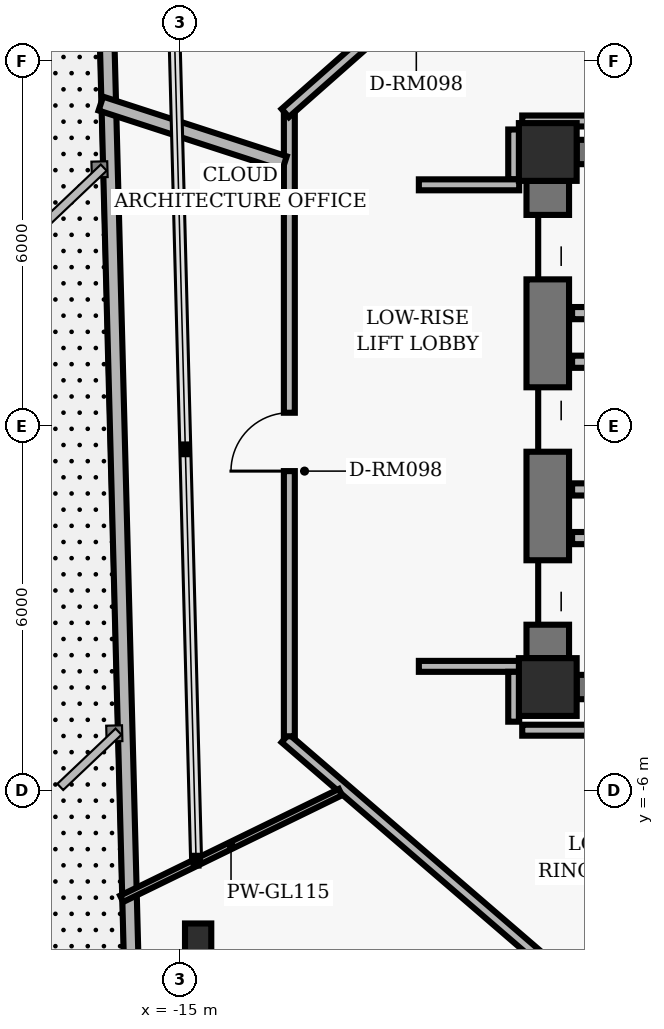
"""IFC4 building model, lengths in metres.
Left out: names, types, materials, properties, quantities, classifications, styles, units other than length and angle.
Written with IfcOpenShell. Run it as: python <this file> out.ifc"""

import sys

from ifc_helpers import new_model, si_unit, direction, frame, frame_2d, origin, origin_2d, place, context, subcontext, project, spatial, rectangle, hollow_rectangle, i_section, extrude, element, fill, save


model = new_model("IFC4")
c1 = context("Model", 3, precision=1e-05, world=origin(), true_north=direction((0.0, 1.0)))
c2 = subcontext(c1, "Body", "Model", "MODEL_VIEW")
j1 = project(units=[si_unit("LENGTHUNIT", "METRE"), si_unit("PLANEANGLEUNIT", "RADIAN")], contexts=[c1])
p1 = place(None, origin())
s1 = spatial("IfcSite", under=j1, at=p1, CompositionType="ELEMENT")
p2 = place(p1, origin())
s2 = spatial("IfcBuilding", under=s1, at=p2, CompositionType="ELEMENT")
p3 = place(p2, frame((0.0, 0.0, 18.88)))
s3 = spatial("IfcBuildingStorey", under=s2, at=p3, CompositionType="ELEMENT", Elevation=18.88)
for number, where, z_axis, x_axis in (
    (1, (-8.95, 4.5, 0.0), (0.0, 0.0, 1.0), (1.0, 0.0, 0.0)),
    (2, (-8.95, -4.3, 0.0), (0.0, 0.0, 1.0), (1.0, 0.0, 0.0)),
):
    element("IfcColumn", number, at=place(p3, frame(where, z_axis=z_axis, x_axis=x_axis)), inside=s3, PredefinedType="COLUMN", context=c2, shape_type="SweptSolid", body=[
        extrude(hollow_rectangle(XDim=0.95, YDim=0.95, WallThickness=0.06, InnerFilletRadius=0.02, OuterFilletRadius=0.04, at=origin_2d()), origin(), (0.0, 0.0, 1.0), 3.36),
    ])
p4 = place(p3, frame((-8.95, -3.825, 0.0), z_axis=(0.0, 0.0, 1.0), x_axis=(0.0, 1.0, 0.0)))
e3 = element("IfcWall", 3, at=p4, inside=s3, PredefinedType="SHEAR", context=c2, shape_type="SweptSolid", body=[
    extrude(rectangle(XDim=7.85, YDim=0.7, at=frame_2d((3.925, 0.0))), origin(), (0.0, 0.0, 1.0), 3.098),
])
p5 = place(p4, frame((0.55, 0.0, 0.0)))
e4 = element("IfcOpeningElement", 4, at=p5, cuts=e3, PredefinedType="OPENING", context=c2, shape_type="SweptSolid", body=[
    extrude(rectangle(XDim=1.06, YDim=2.04, at=frame_2d((0.53, 1.02))), frame((0.0, 0.36, 0.0), z_axis=(0.0, -1.0, 0.0), x_axis=(1.0, 0.0, 0.0)), (0.0, 0.0, 1.0), 0.72),
])
p6 = place(p4, frame((3.395, 0.0, 0.0)))
e5 = element("IfcOpeningElement", 5, at=p6, cuts=e3, PredefinedType="OPENING", context=c2, shape_type="SweptSolid", body=[
    extrude(rectangle(XDim=1.06, YDim=2.04, at=frame_2d((0.53, 1.02))), frame((0.0, 0.36, 0.0), z_axis=(0.0, -1.0, 0.0), x_axis=(1.0, 0.0, 0.0)), (0.0, 0.0, 1.0), 0.72),
])
p7 = place(p4, frame((6.23, 0.0, 0.0)))
e6 = element("IfcOpeningElement", 6, at=p7, cuts=e3, PredefinedType="OPENING", context=c2, shape_type="SweptSolid", body=[
    extrude(rectangle(XDim=1.06, YDim=2.04, at=frame_2d((0.53, 1.02))), frame((0.0, 0.36, 0.0), z_axis=(0.0, -1.0, 0.0), x_axis=(1.0, 0.0, 0.0)), (0.0, 0.0, 1.0), 0.72),
])
for number, where, z_axis, x_axis in (
    (7, (-8.475, 4.5, 0.0), (0.0, 0.0, 1.0), (1.0, 0.0, 0.0)),
    (8, (-8.475, -4.3, 0.0), (0.0, 0.0, 1.0), (1.0, 0.0, 0.0)),
):
    element("IfcWall", number, at=place(p3, frame(where, z_axis=z_axis, x_axis=x_axis)), inside=s3, PredefinedType="SHEAR", context=c2, shape_type="SweptSolid", body=[
        extrude(rectangle(XDim=1.95, YDim=0.4, at=frame_2d((0.975, 0.0))), origin(), (0.0, 0.0, 1.0), 3.098),
    ])
p8 = place(p3, frame((-14.7, -8.438, 0.0), z_axis=(0.0, 0.0, 1.0), x_axis=(1.0, 0.0, 0.0)))
e9 = element("IfcColumn", 9, at=p8, inside=s3, PredefinedType="COLUMN", context=c2, shape_type="SweptSolid", body=[
    extrude(i_section(OverallWidth=0.432, OverallDepth=0.498, WebThickness=0.056, FlangeThickness=0.089, FilletRadius=0.025, at=origin_2d()), origin(), (0.0, 0.0, 1.0), 3.36),
])
p9 = place(p3, frame((30.165, -0.311, 0.0), z_axis=(0.0, 0.0, 1.0), x_axis=(-0.852639202063, -0.522500135029, 0.0)))
e10 = element("IfcWall", 10, at=p9, inside=s3, PredefinedType="PARAPET", context=c2, shape_type="SweptSolid", body=[
    extrude(rectangle(XDim=51.035, YDim=0.24, at=frame_2d((25.518, 0.0))), origin(), (0.0, 0.0, 1.0), 1.65),
])
p10 = place(p3, frame((-15.354, -25.888, 0.0), z_axis=(0.0, 0.0, 1.0), x_axis=(-0.026174886222, 0.999657378971, 0.0)))
e11 = element("IfcWall", 11, at=p10, inside=s3, PredefinedType="PARAPET", context=c2, shape_type="SweptSolid", body=[
    extrude(rectangle(XDim=50.955, YDim=0.24, at=frame_2d((25.478, 0.0))), origin(), (0.0, 0.0, 1.0), 1.65),
])
for number, where, z_axis, x_axis in (
    (12, (-8.55, -1.85, 0.0), (0.0, 0.0, 1.0), (1.0, 0.0, 0.0)),
    (13, (-8.55, 1.85, 0.0), (0.0, 0.0, 1.0), (1.0, 0.0, 0.0)),
):
    element("IfcWall", number, at=place(p3, frame(where, z_axis=z_axis, x_axis=x_axis)), inside=s3, PredefinedType="PARTITIONING", context=c2, shape_type="SweptSolid", body=[
        extrude(rectangle(XDim=2.1, YDim=0.2, at=frame_2d((1.05, 0.0))), origin(), (0.0, 0.0, 1.0), 3.073),
    ])
for number, where, z_axis, x_axis in (
    (14, (-8.55, -1.05, 0.0), (0.0, 0.0, 1.0), (1.0, 0.0, 0.0)),
    (15, (-8.55, 1.05, 0.0), (0.0, 0.0, 1.0), (1.0, 0.0, 0.0)),
):
    element("IfcWall", number, at=place(p3, frame(where, z_axis=z_axis, x_axis=x_axis)), inside=s3, PredefinedType="PARTITIONING", context=c2, shape_type="SweptSolid", body=[
        extrude(rectangle(XDim=1.91, YDim=0.2, at=frame_2d((0.955, 0.0))), origin(), (0.0, 0.0, 1.0), 3.073),
    ])
p11 = place(p3, frame((-8.568, -9.191, 0.0), z_axis=(0.0, 0.0, 1.0), x_axis=(-0.757556899173, 0.652769135694, 0.0)))
e16 = element("IfcWall", 16, at=p11, inside=s3, PredefinedType="PARTITIONING", context=c2, shape_type="SweptSolid", body=[
    extrude(rectangle(XDim=6.204, YDim=0.18, at=frame_2d((3.102, 0.0))), origin(), (0.0, 0.0, 1.0), 3.073),
])
p12 = place(p3, frame((-13.2, -5.11, 0.0), z_axis=(0.0, 0.0, 1.0), x_axis=(0.0, 1.0, 0.0)))
e17 = element("IfcWall", 17, at=p12, inside=s3, PredefinedType="PARTITIONING", context=c2, shape_type="SweptSolid", body=[
    extrude(rectangle(XDim=10.22, YDim=0.18, at=frame_2d((5.11, 0.0))), origin(), (0.0, 0.0, 1.0), 2.587),
])
p13 = place(p12, frame((4.361, 0.0, 0.0)))
e18 = element("IfcOpeningElement", 18, at=p13, cuts=e17, PredefinedType="OPENING", context=c2, shape_type="SweptSolid", body=[
    extrude(rectangle(XDim=0.96, YDim=2.02, at=frame_2d((0.48, 1.01))), frame((0.0, 0.1, 0.0), z_axis=(0.0, -1.0, 0.0), x_axis=(1.0, 0.0, 0.0)), (0.0, 0.0, 1.0), 0.2),
])
p14 = place(p3, frame((-13.268, 5.14, 0.0), z_axis=(0.0, 0.0, 1.0), x_axis=(0.749626463267, 0.66186113768, 0.0)))
e19 = element("IfcWall", 19, at=p14, inside=s3, PredefinedType="PARTITIONING", context=c2, shape_type="SweptSolid", body=[
    extrude(rectangle(XDim=6.27, YDim=0.18, at=frame_2d((3.135, 0.0))), origin(), (0.0, 0.0, 1.0), 3.073),
])
p15 = place(p14, frame((2.655, 0.0, 0.0)))
e20 = element("IfcOpeningElement", 20, at=p15, cuts=e19, PredefinedType="OPENING", context=c2, shape_type="SweptSolid", body=[
    extrude(rectangle(XDim=0.96, YDim=2.02, at=frame_2d((0.48, 1.01))), frame((0.0, 0.1, 0.0), z_axis=(0.0, -1.0, 0.0), x_axis=(1.0, 0.0, 0.0)), (0.0, 0.0, 1.0), 0.2),
])
p16 = place(p3, frame((-9.51, 4.87, 0.0), z_axis=(0.0, 0.0, 1.0), x_axis=(0.0, -1.0, 0.0)))
e21 = element("IfcWall", 21, at=p16, inside=s3, PredefinedType="PARTITIONING", context=c2, shape_type="SweptSolid", body=[
    extrude(rectangle(XDim=0.82, YDim=0.18, at=frame_2d((0.41, 0.0))), origin(), (0.0, 0.0, 1.0), 3.073),
])
for number, where, z_axis, x_axis in (
    (22, (-9.42, 3.96, 0.0), (0.0, 0.0, 1.0), (-1.0, 0.0, 0.0)),
    (23, (-11.07, -3.96, 0.0), (0.0, 0.0, 1.0), (1.0, 0.0, 0.0)),
):
    element("IfcWall", number, at=place(p3, frame(where, z_axis=z_axis, x_axis=x_axis)), inside=s3, PredefinedType="PARTITIONING", context=c2, shape_type="SweptSolid", body=[
        extrude(rectangle(XDim=1.65, YDim=0.18, at=frame_2d((0.825, 0.0))), origin(), (0.0, 0.0, 1.0), 3.073),
    ])
p17 = place(p3, frame((-9.51, -4.05, 0.0), z_axis=(0.0, 0.0, 1.0), x_axis=(0.0, -1.0, 0.0)))
e24 = element("IfcWall", 24, at=p17, inside=s3, PredefinedType="PARTITIONING", context=c2, shape_type="SweptSolid", body=[
    extrude(rectangle(XDim=0.82, YDim=0.18, at=frame_2d((0.41, 0.0))), origin(), (0.0, 0.0, 1.0), 2.358),
])
p18 = place(p3, frame((-9.37, -5.01, 0.0), z_axis=(0.0, 0.0, 1.0), x_axis=(1.0, 0.0, 0.0)))
e25 = element("IfcWall", 25, at=p18, inside=s3, PredefinedType="PARTITIONING", context=c2, shape_type="SweptSolid", body=[
    extrude(rectangle(XDim=3.34, YDim=0.18, at=frame_2d((1.67, 0.0))), origin(), (0.0, 0.0, 1.0), 3.073),
])
p19 = place(p3, frame((-6.562, 5.01, 0.0), z_axis=(0.0, 0.0, 1.0), x_axis=(-1.0, 0.0, 0.0)))
e26 = element("IfcWall", 26, at=p19, inside=s3, PredefinedType="PARTITIONING", context=c2, shape_type="SweptSolid", body=[
    extrude(rectangle(XDim=2.808, YDim=0.18, at=frame_2d((1.404, 0.0))), origin(), (0.0, 0.0, 1.0), 3.073),
])
p20 = place(p3, frame((-12.361, -6.029, 0.0), z_axis=(0.0, 0.0, 1.0), x_axis=(-0.898800692661, -0.438357519466, 0.0)))
e27 = element("IfcWall", 27, at=p20, inside=s3, PredefinedType="MOVABLE", context=c2, shape_type="SweptSolid", body=[
    extrude(rectangle(XDim=4.002, YDim=0.115, at=frame_2d((2.001, 0.0))), origin(), (0.0, 0.0, 1.0), 3.073),
])
p21 = place(p3, frame((-13.28, 4.315, 0.0), z_axis=(0.0, 0.0, 1.0), x_axis=(-0.951062315171, 0.3089991467, 0.0)))
e28 = element("IfcWall", 28, at=p21, inside=s3, PredefinedType="PARTITIONING", context=c2, shape_type="SweptSolid", body=[
    extrude(rectangle(XDim=3.176, YDim=0.24, at=frame_2d((1.588, 0.0))), origin(), (0.0, 0.0, 1.0), 3.073),
])
p22 = place(p5, origin())
e29 = element("IfcDoor", 29, at=p22, inside=s3, OperationType="SLIDING_TO_LEFT", PredefinedType="DOOR", context=c2, shape_type="SweptSolid", body=[
    extrude(rectangle(XDim=1.06, YDim=2.04, at=frame_2d((0.53, 1.02))), frame((0.0, 0.025, 0.0), z_axis=(0.0, -1.0, 0.0), x_axis=(1.0, 0.0, 0.0)), (0.0, 0.0, 1.0), 0.05),
])
fill(e4, e29)
p23 = place(p6, origin())
e30 = element("IfcDoor", 30, at=p23, inside=s3, OperationType="SLIDING_TO_RIGHT", PredefinedType="DOOR", context=c2, shape_type="SweptSolid", body=[
    extrude(rectangle(XDim=1.06, YDim=2.04, at=frame_2d((0.53, 1.02))), frame((0.0, 0.025, 0.0), z_axis=(0.0, -1.0, 0.0), x_axis=(1.0, 0.0, 0.0)), (0.0, 0.0, 1.0), 0.05),
])
fill(e5, e30)
p24 = place(p7, origin())
e31 = element("IfcDoor", 31, at=p24, inside=s3, OperationType="SLIDING_TO_LEFT", PredefinedType="DOOR", context=c2, shape_type="SweptSolid", body=[
    extrude(rectangle(XDim=1.06, YDim=2.04, at=frame_2d((0.53, 1.02))), frame((0.0, 0.025, 0.0), z_axis=(0.0, -1.0, 0.0), x_axis=(1.0, 0.0, 0.0)), (0.0, 0.0, 1.0), 0.05),
])
fill(e6, e31)
p25 = place(p13, origin())
e32 = element("IfcDoor", 32, at=p25, inside=s3, OperationType="SINGLE_SWING_LEFT", PredefinedType="DOOR", context=c2, shape_type="SweptSolid", body=[
    extrude(rectangle(XDim=0.96, YDim=2.02, at=frame_2d((0.48, 1.01))), frame((0.0, 0.025, 0.0), z_axis=(0.0, -1.0, 0.0), x_axis=(1.0, 0.0, 0.0)), (0.0, 0.0, 1.0), 0.05),
])
fill(e18, e32)
save(model, sys.argv[1])
